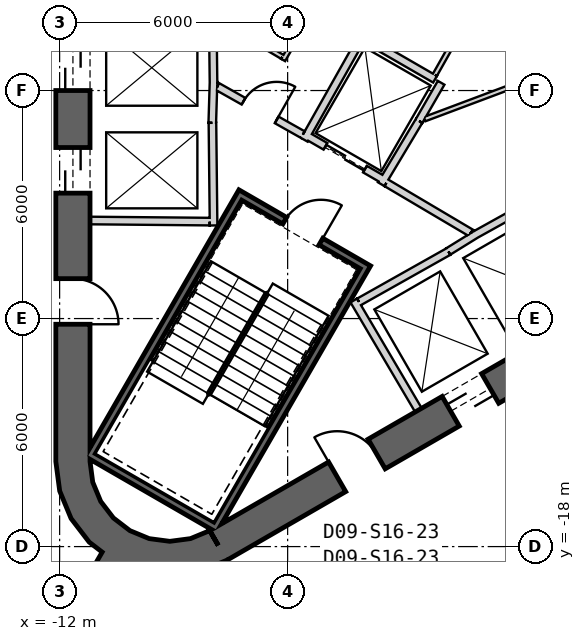
"""IFC4 building model, lengths in metres.
Left out: names, types, materials, properties, quantities, classifications, styles, units other than length and angle.
Written with IfcOpenShell. Run it as: python <this file> out.ifc"""

import sys

from ifc_helpers import new_model, si_unit, direction, frame, frame_2d, origin, place, context, subcontext, project, spatial, polyline, rectangle, outline, extrude, element, fill, save


model = new_model("IFC4")
c1 = context("Model", 3, precision=1e-05, world=origin(), true_north=direction((0.0, 1.0)))
c2 = subcontext(c1, "Body", "Model", "MODEL_VIEW")
j1 = project(units=[si_unit("LENGTHUNIT", "METRE"), si_unit("PLANEANGLEUNIT", "RADIAN")], contexts=[c1])
p1 = place(None, origin())
s1 = spatial("IfcSite", under=j1, at=p1, CompositionType="ELEMENT")
p2 = place(p1, origin())
s2 = spatial("IfcBuilding", under=s1, at=p2, CompositionType="ELEMENT")
p3 = place(p2, frame((0.0, 0.0, 253.2)))
s3 = spatial("IfcBuildingStorey", under=s2, at=p3, CompositionType="ELEMENT", Elevation=253.2)
p4 = place(p3, frame((-11.65, 15.762, 0.0), z_axis=(0.0, 0.0, 1.0), x_axis=(0.0, -1.0, 0.0)))
e1 = element("IfcWall", 1, at=p4, inside=s3, PredefinedType="SHEAR", context=c2, shape_type="SweptSolid", body=[
    extrude(rectangle(XDim=31.523, YDim=0.9, at=frame_2d((15.762, 0.0))), origin(), (0.0, 0.0, 1.0), 4.0),
])
p5 = place(p4, frame((7.062, 0.0, 0.0)))
e2 = element("IfcOpeningElement", 2, at=p5, cuts=e1, PredefinedType="OPENING", context=c2, shape_type="SweptSolid", body=[
    extrude(rectangle(XDim=1.2, YDim=2.4, at=frame_2d((0.6, 1.2))), frame((0.0, 0.46, 0.0), z_axis=(0.0, -1.0, 0.0), x_axis=(1.0, 0.0, 0.0)), (0.0, 0.0, 1.0), 0.92),
])
p6 = place(p4, frame((9.762, 0.0, 0.0)))
e3 = element("IfcOpeningElement", 3, at=p6, cuts=e1, PredefinedType="OPENING", context=c2, shape_type="SweptSolid", body=[
    extrude(rectangle(XDim=1.2, YDim=2.4, at=frame_2d((0.6, 1.2))), frame((0.0, 0.46, 0.0), z_axis=(0.0, -1.0, 0.0), x_axis=(1.0, 0.0, 0.0)), (0.0, 0.0, 1.0), 0.92),
])
p7 = place(p4, frame((12.462, 0.0, 0.0)))
e4 = element("IfcOpeningElement", 4, at=p7, cuts=e1, PredefinedType="OPENING", context=c2, shape_type="SweptSolid", body=[
    extrude(rectangle(XDim=1.2, YDim=2.4, at=frame_2d((0.6, 1.2))), frame((0.0, 0.46, 0.0), z_axis=(0.0, -1.0, 0.0), x_axis=(1.0, 0.0, 0.0)), (0.0, 0.0, 1.0), 0.92),
])
p8 = place(p4, frame((15.162, 0.0, 0.0)))
e5 = element("IfcOpeningElement", 5, at=p8, cuts=e1, PredefinedType="OPENING", context=c2, shape_type="SweptSolid", body=[
    extrude(rectangle(XDim=1.2, YDim=2.4, at=frame_2d((0.6, 1.2))), frame((0.0, 0.46, 0.0), z_axis=(0.0, -1.0, 0.0), x_axis=(1.0, 0.0, 0.0)), (0.0, 0.0, 1.0), 0.92),
])
p9 = place(p4, frame((17.862, 0.0, 0.0)))
e6 = element("IfcOpeningElement", 6, at=p9, cuts=e1, PredefinedType="OPENING", context=c2, shape_type="SweptSolid", body=[
    extrude(rectangle(XDim=1.2, YDim=2.4, at=frame_2d((0.6, 1.2))), frame((0.0, 0.46, 0.0), z_axis=(0.0, -1.0, 0.0), x_axis=(1.0, 0.0, 0.0)), (0.0, 0.0, 1.0), 0.92),
])
p10 = place(p4, frame((20.562, 0.0, 0.0)))
e7 = element("IfcOpeningElement", 7, at=p10, cuts=e1, PredefinedType="OPENING", context=c2, shape_type="SweptSolid", body=[
    extrude(rectangle(XDim=1.2, YDim=2.4, at=frame_2d((0.6, 1.2))), frame((0.0, 0.46, 0.0), z_axis=(0.0, -1.0, 0.0), x_axis=(1.0, 0.0, 0.0)), (0.0, 0.0, 1.0), 0.92),
])
p11 = place(p4, frame((23.262, 0.0, 0.0)))
e8 = element("IfcOpeningElement", 8, at=p11, cuts=e1, PredefinedType="OPENING", context=c2, shape_type="SweptSolid", body=[
    extrude(rectangle(XDim=1.2, YDim=2.4, at=frame_2d((0.6, 1.2))), frame((0.0, 0.46, 0.0), z_axis=(0.0, -1.0, 0.0), x_axis=(1.0, 0.0, 0.0)), (0.0, 0.0, 1.0), 0.92),
])
p12 = place(p4, frame((3.612, 0.0, 0.0)))
e9 = element("IfcOpeningElement", 9, at=p12, cuts=e1, PredefinedType="OPENING", context=c2, shape_type="SweptSolid", body=[
    extrude(rectangle(XDim=1.2, YDim=2.4, at=frame_2d((0.6, 1.2))), frame((0.0, 0.46, 0.0), z_axis=(0.0, -1.0, 0.0), x_axis=(1.0, 0.0, 0.0)), (0.0, 0.0, 1.0), 0.92),
])
p13 = place(p4, frame((26.712, 0.0, 0.0)))
e10 = element("IfcOpeningElement", 10, at=p13, cuts=e1, PredefinedType="OPENING", context=c2, shape_type="SweptSolid", body=[
    extrude(rectangle(XDim=1.2, YDim=2.4, at=frame_2d((0.6, 1.2))), frame((0.0, 0.46, 0.0), z_axis=(0.0, -1.0, 0.0), x_axis=(1.0, 0.0, 0.0)), (0.0, 0.0, 1.0), 0.92),
])
p14 = place(p3, frame((-7.825, -17.97, 0.0), z_axis=(0.0, 0.0, 1.0), x_axis=(0.866028369851, 0.499994862586, 0.0)))
e11 = element("IfcWall", 11, at=p14, inside=s3, PredefinedType="SHEAR", context=c2, shape_type="SweptSolid", body=[
    extrude(rectangle(XDim=31.523, YDim=0.9, at=frame_2d((15.762, 0.0))), origin(), (0.0, 0.0, 1.0), 4.0),
])
p15 = place(p14, frame((7.062, 0.0, 0.0)))
e12 = element("IfcOpeningElement", 12, at=p15, cuts=e11, PredefinedType="OPENING", context=c2, shape_type="SweptSolid", body=[
    extrude(rectangle(XDim=1.2, YDim=2.4, at=frame_2d((0.6, 1.2))), frame((0.0, 0.46, 0.0), z_axis=(0.0, -1.0, 0.0), x_axis=(1.0, 0.0, 0.0)), (0.0, 0.0, 1.0), 0.92),
])
p16 = place(p14, frame((9.762, 0.0, 0.0)))
e13 = element("IfcOpeningElement", 13, at=p16, cuts=e11, PredefinedType="OPENING", context=c2, shape_type="SweptSolid", body=[
    extrude(rectangle(XDim=1.2, YDim=2.4, at=frame_2d((0.6, 1.2))), frame((0.0, 0.46, 0.0), z_axis=(0.0, -1.0, 0.0), x_axis=(1.0, 0.0, 0.0)), (0.0, 0.0, 1.0), 0.92),
])
p17 = place(p14, frame((12.462, 0.0, 0.0)))
e14 = element("IfcOpeningElement", 14, at=p17, cuts=e11, PredefinedType="OPENING", context=c2, shape_type="SweptSolid", body=[
    extrude(rectangle(XDim=1.2, YDim=2.4, at=frame_2d((0.6, 1.2))), frame((0.0, 0.46, 0.0), z_axis=(0.0, -1.0, 0.0), x_axis=(1.0, 0.0, 0.0)), (0.0, 0.0, 1.0), 0.92),
])
p18 = place(p14, frame((15.162, 0.0, 0.0)))
e15 = element("IfcOpeningElement", 15, at=p18, cuts=e11, PredefinedType="OPENING", context=c2, shape_type="SweptSolid", body=[
    extrude(rectangle(XDim=1.2, YDim=2.4, at=frame_2d((0.6, 1.2))), frame((0.0, 0.46, 0.0), z_axis=(0.0, -1.0, 0.0), x_axis=(1.0, 0.0, 0.0)), (0.0, 0.0, 1.0), 0.92),
])
p19 = place(p14, frame((17.862, 0.0, 0.0)))
e16 = element("IfcOpeningElement", 16, at=p19, cuts=e11, PredefinedType="OPENING", context=c2, shape_type="SweptSolid", body=[
    extrude(rectangle(XDim=1.2, YDim=2.4, at=frame_2d((0.6, 1.2))), frame((0.0, 0.46, 0.0), z_axis=(0.0, -1.0, 0.0), x_axis=(1.0, 0.0, 0.0)), (0.0, 0.0, 1.0), 0.92),
])
p20 = place(p14, frame((20.562, 0.0, 0.0)))
e17 = element("IfcOpeningElement", 17, at=p20, cuts=e11, PredefinedType="OPENING", context=c2, shape_type="SweptSolid", body=[
    extrude(rectangle(XDim=1.2, YDim=2.4, at=frame_2d((0.6, 1.2))), frame((0.0, 0.46, 0.0), z_axis=(0.0, -1.0, 0.0), x_axis=(1.0, 0.0, 0.0)), (0.0, 0.0, 1.0), 0.92),
])
p21 = place(p14, frame((26.712, 0.0, 0.0)))
e18 = element("IfcOpeningElement", 18, at=p21, cuts=e11, PredefinedType="OPENING", context=c2, shape_type="SweptSolid", body=[
    extrude(rectangle(XDim=1.2, YDim=2.4, at=frame_2d((0.6, 1.2))), frame((0.0, 0.46, 0.0), z_axis=(0.0, -1.0, 0.0), x_axis=(1.0, 0.0, 0.0)), (0.0, 0.0, 1.0), 0.92),
])
p22 = place(p14, frame((3.612, 0.0, 0.0)))
e19 = element("IfcOpeningElement", 19, at=p22, cuts=e11, PredefinedType="OPENING", context=c2, shape_type="SweptSolid", body=[
    extrude(rectangle(XDim=1.2, YDim=2.4, at=frame_2d((0.6, 1.2))), frame((0.0, 0.46, 0.0), z_axis=(0.0, -1.0, 0.0), x_axis=(1.0, 0.0, 0.0)), (0.0, 0.0, 1.0), 0.92),
])
p23 = place(p3, origin())
e20 = element("IfcWall", 20, at=p23, inside=s3, PredefinedType="SHEAR", context=c2, shape_type="SweptSolid", body=[
    extrude(outline(polyline([(-12.1, -15.762), (-11.998, -16.538), (-11.698, -17.262), (-11.221, -17.883), (-10.6, -18.36), (-9.876, -18.659), (-9.1, -18.762), (-8.323, -18.659), (-7.6, -18.36), (-8.05, -17.58), (-8.556, -17.79), (-9.1, -17.862), (-9.644, -17.79), (-10.15, -17.58), (-10.585, -17.247), (-10.919, -16.812), (-11.128, -16.305), (-11.2, -15.762), (-12.1, -15.762)])), origin(), (0.0, 0.0, 1.0), 4.0),
])
p24 = place(p3, frame((-10.575, -18.316, 0.0), z_axis=(0.0, 0.0, 1.0), x_axis=(-0.500010108608, -0.866019567498, 0.0)))
e21 = element("IfcWall", 21, at=p24, inside=s3, PredefinedType="SHEAR", context=c2, shape_type="SweptSolid", body=[
    extrude(rectangle(XDim=10.432, YDim=0.7, at=frame_2d((5.216, 0.0))), origin(), (0.0, 0.0, 1.0), 4.0),
])
p25 = place(p3, frame((-7.95, -5.772, 0.0), z_axis=(0.0, 0.0, 1.0), x_axis=(-0.030803413295, -0.999525462272, 0.0)))
e22 = element("IfcWall", 22, at=p25, inside=s3, PredefinedType="PLUMBINGWALL", context=c2, shape_type="SweptSolid", body=[
    extrude(rectangle(XDim=1.078, YDim=0.2, at=frame_2d((0.539, 0.0))), origin(), (0.0, 0.0, 1.0), 3.7),
])
p26 = place(p3, frame((-7.971, -4.05, 0.0), z_axis=(0.0, 0.0, 1.0), x_axis=(0.012042535896, -0.999927486035, 0.0)))
e23 = element("IfcWall", 23, at=p26, inside=s3, PredefinedType="PLUMBINGWALL", context=c2, shape_type="SweptSolid", body=[
    extrude(rectangle(XDim=1.845, YDim=0.2, at=frame_2d((0.922, 0.0))), origin(), (0.0, 0.0, 1.0), 3.7),
])
p27 = place(p3, frame((-7.979, -6.85, 0.0), z_axis=(0.0, 0.0, 1.0), x_axis=(0.011121475088, -0.999938154483, 0.0)))
e24 = element("IfcWall", 24, at=p27, inside=s3, PredefinedType="PLUMBINGWALL", context=c2, shape_type="SweptSolid", body=[
    extrude(rectangle(XDim=2.7, YDim=0.2, at=frame_2d((1.35, 0.0))), origin(), (0.0, 0.0, 1.0), 3.7),
])
p28 = place(p3, frame((-8.05, -9.449, 0.0), z_axis=(0.0, 0.0, 1.0), x_axis=(-0.999957467379, 0.009222983926, 0.0)))
e25 = element("IfcWall", 25, at=p28, inside=s3, PredefinedType="PLUMBINGWALL", context=c2, shape_type="SweptSolid", body=[
    extrude(rectangle(XDim=3.15, YDim=0.2, at=frame_2d((1.575, 0.0))), origin(), (0.0, 0.0, 1.0), 3.7),
])
p29 = place(p3, frame((-2.558, -14.409, 0.0), z_axis=(0.0, 0.0, 1.0), x_axis=(-0.507997497166, 0.861358544901, 0.0)))
e26 = element("IfcWall", 26, at=p29, inside=s3, PredefinedType="PLUMBINGWALL", context=c2, shape_type="SweptSolid", body=[
    extrude(rectangle(XDim=3.35, YDim=0.2, at=frame_2d((1.675, 0.0))), origin(), (0.0, 0.0, 1.0), 3.7),
])
p30 = place(p3, frame((-1.769, -10.237, 0.0), z_axis=(0.0, 0.0, 1.0), x_axis=(-0.871534483978, -0.490334215854, 0.0)))
e27 = element("IfcWall", 27, at=p30, inside=s3, PredefinedType="PLUMBINGWALL", context=c2, shape_type="SweptSolid", body=[
    extrude(rectangle(XDim=2.7, YDim=0.2, at=frame_2d((1.35, 0.0))), origin(), (0.0, 0.0, 1.0), 3.7),
])
p31 = place(p3, frame((-1.024, -9.771, 0.0), z_axis=(0.0, 0.0, 1.0), x_axis=(-0.850348075135, -0.526220629693, 0.0)))
e28 = element("IfcWall", 28, at=p31, inside=s3, PredefinedType="PLUMBINGWALL", context=c2, shape_type="SweptSolid", body=[
    extrude(rectangle(XDim=0.878, YDim=0.2, at=frame_2d((0.439, 0.0))), origin(), (0.0, 0.0, 1.0), 3.7),
])
p32 = place(p3, frame((-1.13, -9.831, 0.0), z_axis=(0.0, 0.0, 1.0), x_axis=(0.874269620932, 0.485440655401, 0.0)))
e29 = element("IfcWall", 29, at=p32, inside=s3, PredefinedType="PLUMBINGWALL", context=c2, shape_type="SweptSolid", body=[
    extrude(rectangle(XDim=1.845, YDim=0.2, at=frame_2d((0.922, 0.0))), origin(), (0.0, 0.0, 1.0), 3.7),
])
p33 = place(p3, frame((-3.905, -10.563, -0.3), z_axis=(0.0, 0.0, 1.0), x_axis=(-0.500012932018, -0.866017937352, 0.0)))
e30 = element("IfcWall", 30, at=p33, inside=s3, PredefinedType="SHEAR", context=c2, shape_type="SweptSolid", body=[
    extrude(rectangle(XDim=8.1, YDim=0.2, at=frame_2d((4.05, 0.0))), origin(), (0.0, 0.0, 1.0), 4.0),
])
p34 = place(p3, frame((-11.282, -15.541, -0.3), z_axis=(0.0, 0.0, 1.0), x_axis=(0.866000483506, -0.500043160704, 0.0)))
e31 = element("IfcWall", 31, at=p34, inside=s3, PredefinedType="SHEAR", context=c2, shape_type="SweptSolid", body=[
    extrude(rectangle(XDim=3.8, YDim=0.2, at=frame_2d((1.9, 0.0))), origin(), (0.0, 0.0, 1.0), 4.0),
])
p35 = place(p3, frame((-7.196, -8.663, -0.3), z_axis=(0.0, 0.0, 1.0), x_axis=(-0.499997992926, -0.866026562566, 0.0)))
e32 = element("IfcWall", 32, at=p35, inside=s3, PredefinedType="SHEAR", context=c2, shape_type="SweptSolid", body=[
    extrude(rectangle(XDim=7.9, YDim=0.2, at=frame_2d((3.95, 0.0))), origin(), (0.0, 0.0, 1.0), 4.0),
])
p36 = place(p3, frame((-4.041, -10.599, -0.3), z_axis=(0.0, 0.0, 1.0), x_axis=(-0.866047807691, 0.499961193289, 0.0)))
e33 = element("IfcWall", 33, at=p36, inside=s3, PredefinedType="SHEAR", context=c2, shape_type="SweptSolid", body=[
    extrude(rectangle(XDim=3.6, YDim=0.2, at=frame_2d((1.8, 0.0))), origin(), (0.0, 0.0, 1.0), 4.0),
])
p37 = place(p36, frame((1.25, 0.0, 0.3)))
e34 = element("IfcOpeningElement", 34, at=p37, cuts=e33, PredefinedType="OPENING", context=c2, shape_type="SweptSolid", body=[
    extrude(rectangle(XDim=1.1, YDim=2.1, at=frame_2d((0.55, 1.05))), frame((0.0, 0.11, 0.0), z_axis=(0.0, -1.0, 0.0), x_axis=(1.0, 0.0, 0.0)), (0.0, 0.0, 1.0), 0.22),
])
p38 = place(p3, frame((-3.446, -8.368, 0.0), z_axis=(0.0, 0.0, 1.0), x_axis=(-0.866024647952, 0.500001309137, 0.0)))
e35 = element("IfcWall", 35, at=p38, inside=s3, PredefinedType="PLUMBINGWALL", context=c2, shape_type="SweptSolid", body=[
    extrude(rectangle(XDim=2.4, YDim=0.2, at=frame_2d((1.2, 0.0))), origin(), (0.0, 0.0, 1.0), 3.7),
])
p39 = place(p38, frame((0.6, 0.0, 0.0)))
e36 = element("IfcOpeningElement", 36, at=p39, cuts=e35, PredefinedType="OPENING", context=c2, shape_type="SweptSolid", body=[
    extrude(rectangle(XDim=1.2, YDim=2.4, at=frame_2d((0.6, 1.2))), frame((0.0, 0.11, 0.0), z_axis=(0.0, -1.0, 0.0), x_axis=(1.0, 0.0, 0.0)), (0.0, 0.0, 1.0), 0.22),
])
p40 = place(p3, frame((-1.961, -5.796, 0.0), z_axis=(0.0, 0.0, 1.0), x_axis=(-0.500074377092, -0.865982457891, 0.0)))
e37 = element("IfcWall", 37, at=p40, inside=s3, PredefinedType="PLUMBINGWALL", context=c2, shape_type="SweptSolid", body=[
    extrude(rectangle(XDim=1.161, YDim=0.2, at=frame_2d((0.581, 0.0))), origin(), (0.0, 0.0, 1.0), 3.7),
])
p41 = place(p3, frame((-2.542, -6.801, 0.0), z_axis=(0.0, 0.0, 1.0), x_axis=(-0.51375503712, -0.857936921827, 0.0)))
e38 = element("IfcWall", 38, at=p41, inside=s3, PredefinedType="PLUMBINGWALL", context=c2, shape_type="SweptSolid", body=[
    extrude(rectangle(XDim=1.939, YDim=0.2, at=frame_2d((0.97, 0.0))), origin(), (0.0, 0.0, 1.0), 3.7),
])
p42 = place(p3, frame((-3.99, -4.509, 0.0), z_axis=(0.0, 0.0, 1.0), x_axis=(-0.491358283181, -0.870957540612, 0.0)))
e39 = element("IfcWall", 39, at=p42, inside=s3, PredefinedType="PLUMBINGWALL", context=c2, shape_type="SweptSolid", body=[
    extrude(rectangle(XDim=3.2, YDim=0.2, at=frame_2d((1.6, 0.0))), origin(), (0.0, 0.0, 1.0), 3.7),
])
p43 = place(p3, frame((-3.953, -4.646, 0.0), z_axis=(0.0, 0.0, 1.0), x_axis=(0.866060616833, -0.499939004251, 0.0)))
e40 = element("IfcWall", 40, at=p43, inside=s3, PredefinedType="PLUMBINGWALL", context=c2, shape_type="SweptSolid", body=[
    extrude(rectangle(XDim=2.115, YDim=0.2, at=frame_2d((1.057, 0.0))), origin(), (0.0, 0.0, 1.0), 3.7),
])
p44 = place(p3, frame((-3.401, -8.43, 0.0), z_axis=(0.0, 0.0, 1.0), x_axis=(0.860615607571, -0.509255118781, 0.0)))
e41 = element("IfcWall", 41, at=p44, inside=s3, PredefinedType="PARTITIONING", context=c2, shape_type="SweptSolid", body=[
    extrude(rectangle(XDim=2.581, YDim=0.2, at=frame_2d((1.29, 0.0))), origin(), (0.0, 0.0, 1.0), 3.7),
])
p45 = place(p3, frame((-7.849, -5.894, 0.0), z_axis=(0.0, 0.0, 1.0), x_axis=(0.871363259478, -0.490638431059, 0.0)))
e42 = element("IfcWall", 42, at=p45, inside=s3, PredefinedType="PARTITIONING", context=c2, shape_type="SweptSolid", body=[
    extrude(rectangle(XDim=2.581, YDim=0.2, at=frame_2d((1.291, 0.0))), origin(), (0.0, 0.0, 1.0), 3.7),
])
p46 = place(p45, frame((0.791, 0.0, 0.0)))
e43 = element("IfcOpeningElement", 43, at=p46, cuts=e42, PredefinedType="OPENING", context=c2, shape_type="SweptSolid", body=[
    extrude(rectangle(XDim=1.0, YDim=2.1, at=frame_2d((0.5, 1.05))), frame((0.0, 0.11, 0.0), z_axis=(0.0, -1.0, 0.0), x_axis=(1.0, 0.0, 0.0)), (0.0, 0.0, 1.0), 0.22),
])
p47 = place(p3, frame((7.5, -3.042, 0.0), z_axis=(0.0, 0.0, 1.0), x_axis=(-0.936345316301, -0.35108040196, 0.0)))
e44 = element("IfcWall", 44, at=p47, inside=s3, PredefinedType="PARTITIONING", context=c2, shape_type="SweptSolid", body=[
    extrude(rectangle(XDim=10.568, YDim=0.12, at=frame_2d((5.284, 0.0))), origin(), (0.0, 0.0, 1.0), 3.7),
])
p48 = place(p3, frame((-0.466, -2.655, 0.0), z_axis=(0.0, 0.0, 1.0), x_axis=(-0.49235580986, -0.870394023703, 0.0)))
e45 = element("IfcWall", 45, at=p48, inside=s3, PredefinedType="PARTITIONING", context=c2, shape_type="SweptSolid", body=[
    extrude(rectangle(XDim=3.368, YDim=0.12, at=frame_2d((1.684, 0.0))), origin(), (0.0, 0.0, 1.0), 3.7),
])
p49 = place(p48, frame((1.335, 0.0, 0.0)))
e46 = element("IfcOpeningElement", 46, at=p49, cuts=e45, PredefinedType="OPENING", context=c2, shape_type="SweptSolid", body=[
    extrude(rectangle(XDim=0.8, YDim=2.1, at=frame_2d((0.4, 1.05))), frame((0.0, 0.07, 0.0), z_axis=(0.0, -1.0, 0.0), x_axis=(1.0, 0.0, 0.0)), (0.0, 0.0, 1.0), 0.14),
])
p50 = place(p3, frame((-6.118, -5.197, 0.0), z_axis=(0.0, 0.0, 1.0), x_axis=(0.499990139034, 0.866031096941, 0.0)))
e47 = element("IfcWall", 47, at=p50, inside=s3, PredefinedType="PARTITIONING", context=c2, shape_type="SweptSolid", body=[
    extrude(rectangle(XDim=3.0, YDim=0.12, at=frame_2d((1.5, 0.0))), origin(), (0.0, 0.0, 1.0), 3.7),
])
p51 = place(p3, frame((-7.95, -4.041, 0.0), z_axis=(0.0, 0.0, 1.0), x_axis=(0.860112457103, -0.510104461004, 0.0)))
e48 = element("IfcWall", 48, at=p51, inside=s3, PredefinedType="PARTITIONING", context=c2, shape_type="SweptSolid", body=[
    extrude(rectangle(XDim=2.104, YDim=0.12, at=frame_2d((1.052, 0.0))), origin(), (0.0, 0.0, 1.0), 3.7),
])
p52 = place(p3, frame((-0.723, -19.008, 0.0), z_axis=(0.0, 0.0, 1.0), x_axis=(0.866014659605, 0.500018609004, 0.0)))
e49 = element("IfcWall", 49, at=p52, inside=s3, PredefinedType="PARTITIONING", context=c2, shape_type="SweptSolid", body=[
    extrude(rectangle(XDim=5.78, YDim=0.2, at=frame_2d((2.89, 0.0))), origin(), (0.0, 0.0, 1.0), 2.98),
])
p53 = place(p37, origin())
e50 = element("IfcDoor", 50, at=p53, inside=s3, OperationType="SINGLE_SWING_RIGHT", PredefinedType="USERDEFINED", context=c2, shape_type="SweptSolid", body=[
    extrude(rectangle(XDim=1.1, YDim=2.1, at=frame_2d((0.55, 1.05))), frame((0.0, 0.025, 0.0), z_axis=(0.0, -1.0, 0.0), x_axis=(1.0, 0.0, 0.0)), (0.0, 0.0, 1.0), 0.05),
])
fill(e34, e50)
p54 = place(p46, origin())
e51 = element("IfcDoor", 51, at=p54, inside=s3, OperationType="SINGLE_SWING_RIGHT", PredefinedType="USERDEFINED", context=c2, shape_type="SweptSolid", body=[
    extrude(rectangle(XDim=1.0, YDim=2.1, at=frame_2d((0.5, 1.05))), frame((0.0, 0.025, 0.0), z_axis=(0.0, -1.0, 0.0), x_axis=(1.0, 0.0, 0.0)), (0.0, 0.0, 1.0), 0.05),
])
fill(e43, e51)
p55 = place(p39, origin())
e52 = element("IfcDoor", 52, at=p55, inside=s3, OperationType="SLIDING_TO_LEFT", PredefinedType="USERDEFINED", context=c2, shape_type="SweptSolid", body=[
    extrude(rectangle(XDim=1.2, YDim=2.4, at=frame_2d((0.6, 1.2))), frame((0.0, 0.025, 0.0), z_axis=(0.0, -1.0, 0.0), x_axis=(1.0, 0.0, 0.0)), (0.0, 0.0, 1.0), 0.05),
])
fill(e36, e52)
p56 = place(p10, origin())
e53 = element("IfcDoor", 53, at=p56, inside=s3, OperationType="SLIDING_TO_LEFT", PredefinedType="USERDEFINED", context=c2, shape_type="SweptSolid", body=[
    extrude(rectangle(XDim=1.2, YDim=2.4, at=frame_2d((0.6, 1.2))), frame((0.0, 0.025, 0.0), z_axis=(0.0, -1.0, 0.0), x_axis=(1.0, 0.0, 0.0)), (0.0, 0.0, 1.0), 0.05),
])
fill(e7, e53)
p57 = place(p11, origin())
e54 = element("IfcDoor", 54, at=p57, inside=s3, OperationType="SLIDING_TO_LEFT", PredefinedType="USERDEFINED", context=c2, shape_type="SweptSolid", body=[
    extrude(rectangle(XDim=1.2, YDim=2.4, at=frame_2d((0.6, 1.2))), frame((0.0, 0.025, 0.0), z_axis=(0.0, -1.0, 0.0), x_axis=(1.0, 0.0, 0.0)), (0.0, 0.0, 1.0), 0.05),
])
fill(e8, e54)
p58 = place(p15, origin())
e55 = element("IfcDoor", 55, at=p58, inside=s3, OperationType="SLIDING_TO_LEFT", PredefinedType="USERDEFINED", context=c2, shape_type="SweptSolid", body=[
    extrude(rectangle(XDim=1.2, YDim=2.4, at=frame_2d((0.6, 1.2))), frame((0.0, 0.025, 0.0), z_axis=(0.0, -1.0, 0.0), x_axis=(1.0, 0.0, 0.0)), (0.0, 0.0, 1.0), 0.05),
])
fill(e12, e55)
p59 = place(p13, origin())
e56 = element("IfcDoor", 56, at=p59, inside=s3, OperationType="SINGLE_SWING_RIGHT", PredefinedType="USERDEFINED", context=c2, shape_type="SweptSolid", body=[
    extrude(rectangle(XDim=1.2, YDim=2.4, at=frame_2d((0.6, 1.2))), frame((0.0, 0.025, 0.0), z_axis=(0.0, -1.0, 0.0), x_axis=(1.0, 0.0, 0.0)), (0.0, 0.0, 1.0), 0.05),
])
fill(e10, e56)
p60 = place(p22, origin())
e57 = element("IfcDoor", 57, at=p60, inside=s3, OperationType="SINGLE_SWING_RIGHT", PredefinedType="USERDEFINED", context=c2, shape_type="SweptSolid", body=[
    extrude(rectangle(XDim=1.2, YDim=2.4, at=frame_2d((0.6, 1.2))), frame((0.0, 0.025, 0.0), z_axis=(0.0, -1.0, 0.0), x_axis=(1.0, 0.0, 0.0)), (0.0, 0.0, 1.0), 0.05),
])
fill(e19, e57)
save(model, sys.argv[1])
